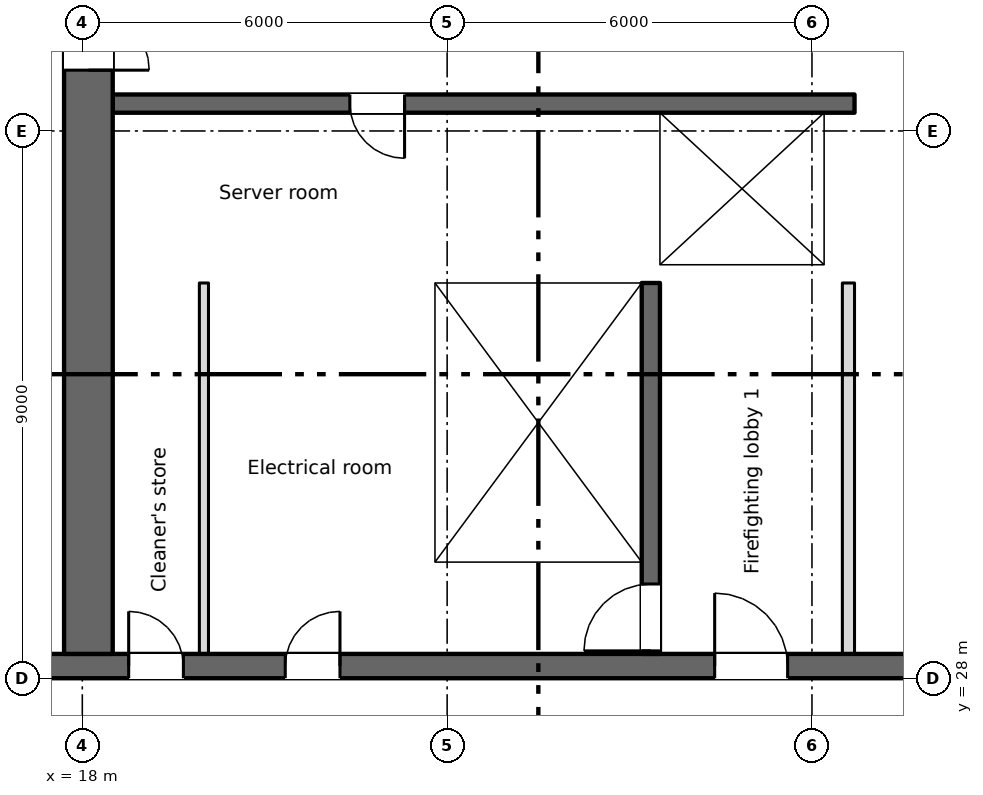
"""IFC4 building model, lengths in metres.
Left out: names, types, materials, properties, quantities, classifications, styles, units other than length and angle.
Written with IfcOpenShell. Run it as: python <this file> out.ifc"""

import sys

from ifc_helpers import new_model, si_unit, direction, frame, frame_2d, origin, place, context, subcontext, project, spatial, rectangle, extrude, element, fill, save


model = new_model("IFC4")
c1 = context("Model", 3, precision=1e-05, world=origin(), true_north=direction((0.0, 1.0)))
c2 = subcontext(c1, "Body", "Model", "MODEL_VIEW")
j1 = project(units=[si_unit("LENGTHUNIT", "METRE"), si_unit("PLANEANGLEUNIT", "RADIAN")], contexts=[c1])
p1 = place(None, origin())
s1 = spatial("IfcSite", under=j1, at=p1, CompositionType="ELEMENT")
p2 = place(p1, origin())
s2 = spatial("IfcBuilding", under=s1, at=p2, CompositionType="ELEMENT")
p3 = place(p2, frame((0.0, 0.0, 128.75)))
s3 = spatial("IfcBuildingStorey", under=s2, at=p3, CompositionType="ELEMENT", Elevation=128.75)
p4 = place(p3, frame((6.7, 28.2, 0.0), z_axis=(0.0, 0.0, 1.0), x_axis=(1.0, 0.0, 0.0)))
e1 = element("IfcWall", 1, at=p4, inside=s3, PredefinedType="SHEAR", context=c2, shape_type="SweptSolid", body=[
    extrude(rectangle(XDim=57.8, YDim=0.4, at=frame_2d((28.9, 0.0))), origin(), (0.0, 0.0, 1.0), 3.35),
])
p5 = place(p4, frame((12.062, 0.0, 0.0)))
e2 = element("IfcOpeningElement", 2, at=p5, cuts=e1, PredefinedType="OPENING", context=c2, shape_type="SweptSolid", body=[
    extrude(rectangle(XDim=0.9, YDim=2.1, at=frame_2d((0.45, 1.05))), frame((0.0, 0.21, 0.0), z_axis=(0.0, -1.0, 0.0), x_axis=(1.0, 0.0, 0.0)), (0.0, 0.0, 1.0), 0.42),
])
p6 = place(p4, frame((14.637, 0.0, 0.0)))
e3 = element("IfcOpeningElement", 3, at=p6, cuts=e1, PredefinedType="OPENING", context=c2, shape_type="SweptSolid", body=[
    extrude(rectangle(XDim=0.9, YDim=2.1, at=frame_2d((0.45, 1.05))), frame((0.0, 0.21, 0.0), z_axis=(0.0, -1.0, 0.0), x_axis=(1.0, 0.0, 0.0)), (0.0, 0.0, 1.0), 0.42),
])
p7 = place(p4, frame((49.062, 0.0, 0.0)))
e4 = element("IfcOpeningElement", 4, at=p7, cuts=e1, PredefinedType="OPENING", context=c2, shape_type="SweptSolid", body=[
    extrude(rectangle(XDim=0.9, YDim=2.1, at=frame_2d((0.45, 1.05))), frame((0.0, 0.21, 0.0), z_axis=(0.0, -1.0, 0.0), x_axis=(1.0, 0.0, 0.0)), (0.0, 0.0, 1.0), 0.42),
])
p8 = place(p4, frame((51.637, 0.0, 0.0)))
e5 = element("IfcOpeningElement", 5, at=p8, cuts=e1, PredefinedType="OPENING", context=c2, shape_type="SweptSolid", body=[
    extrude(rectangle(XDim=0.9, YDim=2.1, at=frame_2d((0.45, 1.05))), frame((0.0, 0.21, 0.0), z_axis=(0.0, -1.0, 0.0), x_axis=(1.0, 0.0, 0.0)), (0.0, 0.0, 1.0), 0.42),
])
p9 = place(p4, frame((1.35, 0.0, 0.0)))
e6 = element("IfcOpeningElement", 6, at=p9, cuts=e1, PredefinedType="OPENING", context=c2, shape_type="SweptSolid", body=[
    extrude(rectangle(XDim=0.9, YDim=2.1, at=frame_2d((0.45, 1.05))), frame((0.0, 0.21, 0.0), z_axis=(0.0, -1.0, 0.0), x_axis=(1.0, 0.0, 0.0)), (0.0, 0.0, 1.0), 0.42),
])
p10 = place(p4, frame((4.7, 0.0, 0.0)))
e7 = element("IfcOpeningElement", 7, at=p10, cuts=e1, PredefinedType="OPENING", context=c2, shape_type="SweptSolid", body=[
    extrude(rectangle(XDim=1.2, YDim=2.1, at=frame_2d((0.6, 1.05))), frame((0.0, 0.21, 0.0), z_axis=(0.0, -1.0, 0.0), x_axis=(1.0, 0.0, 0.0)), (0.0, 0.0, 1.0), 0.42),
])
p11 = place(p4, frame((31.7, 0.0, 0.0)))
e8 = element("IfcOpeningElement", 8, at=p11, cuts=e1, PredefinedType="OPENING", context=c2, shape_type="SweptSolid", body=[
    extrude(rectangle(XDim=1.2, YDim=2.1, at=frame_2d((0.6, 1.05))), frame((0.0, 0.21, 0.0), z_axis=(0.0, -1.0, 0.0), x_axis=(1.0, 0.0, 0.0)), (0.0, 0.0, 1.0), 0.42),
])
p12 = place(p4, frame((55.2, 0.0, 0.0)))
e9 = element("IfcOpeningElement", 9, at=p12, cuts=e1, PredefinedType="OPENING", context=c2, shape_type="SweptSolid", body=[
    extrude(rectangle(XDim=1.2, YDim=2.1, at=frame_2d((0.6, 1.05))), frame((0.0, 0.21, 0.0), z_axis=(0.0, -1.0, 0.0), x_axis=(1.0, 0.0, 0.0)), (0.0, 0.0, 1.0), 0.42),
])
p13 = place(p4, frame((21.7, 0.0, 0.0)))
e10 = element("IfcOpeningElement", 10, at=p13, cuts=e1, PredefinedType="OPENING", context=c2, shape_type="SweptSolid", body=[
    extrude(rectangle(XDim=1.2, YDim=2.1, at=frame_2d((0.6, 1.05))), frame((0.0, 0.21, 0.0), z_axis=(0.0, -1.0, 0.0), x_axis=(1.0, 0.0, 0.0)), (0.0, 0.0, 1.0), 0.42),
])
p14 = place(p4, frame((41.7, 0.0, 0.0)))
e11 = element("IfcOpeningElement", 11, at=p14, cuts=e1, PredefinedType="OPENING", context=c2, shape_type="SweptSolid", body=[
    extrude(rectangle(XDim=1.2, YDim=2.1, at=frame_2d((0.6, 1.05))), frame((0.0, 0.21, 0.0), z_axis=(0.0, -1.0, 0.0), x_axis=(1.0, 0.0, 0.0)), (0.0, 0.0, 1.0), 0.42),
])
p15 = place(p4, frame((24.85, 0.0, 0.0)))
e12 = element("IfcOpeningElement", 12, at=p15, cuts=e1, PredefinedType="OPENING", context=c2, shape_type="SweptSolid", body=[
    extrude(rectangle(XDim=2.4, YDim=2.1, at=frame_2d((1.2, 1.05))), frame((0.0, 0.21, 0.0), z_axis=(0.0, -1.0, 0.0), x_axis=(1.0, 0.0, 0.0)), (0.0, 0.0, 1.0), 0.42),
])
p16 = place(p4, frame((37.35, 0.0, 0.0)))
e13 = element("IfcOpeningElement", 13, at=p16, cuts=e1, PredefinedType="OPENING", context=c2, shape_type="SweptSolid", body=[
    extrude(rectangle(XDim=2.4, YDim=2.1, at=frame_2d((1.2, 1.05))), frame((0.0, 0.21, 0.0), z_axis=(0.0, -1.0, 0.0), x_axis=(1.0, 0.0, 0.0)), (0.0, 0.0, 1.0), 0.42),
])
p17 = place(p4, frame((7.95, 0.0, 0.0)))
e14 = element("IfcOpeningElement", 14, at=p17, cuts=e1, PredefinedType="OPENING", context=c2, shape_type="SweptSolid", body=[
    extrude(rectangle(XDim=2.4, YDim=2.1, at=frame_2d((1.2, 1.05))), frame((0.0, 0.21, 0.0), z_axis=(0.0, -1.0, 0.0), x_axis=(1.0, 0.0, 0.0)), (0.0, 0.0, 1.0), 0.42),
])
p18 = place(p4, frame((28.85, 0.0, 0.0)))
e15 = element("IfcOpeningElement", 15, at=p18, cuts=e1, PredefinedType="OPENING", context=c2, shape_type="SweptSolid", body=[
    extrude(rectangle(XDim=0.9, YDim=2.1, at=frame_2d((0.45, 1.05))), frame((0.0, 0.21, 0.0), z_axis=(0.0, -1.0, 0.0), x_axis=(1.0, 0.0, 0.0)), (0.0, 0.0, 1.0), 0.42),
])
p19 = place(p4, frame((34.85, 0.0, 0.0)))
e16 = element("IfcOpeningElement", 16, at=p19, cuts=e1, PredefinedType="OPENING", context=c2, shape_type="SweptSolid", body=[
    extrude(rectangle(XDim=0.9, YDim=2.1, at=frame_2d((0.45, 1.05))), frame((0.0, 0.21, 0.0), z_axis=(0.0, -1.0, 0.0), x_axis=(1.0, 0.0, 0.0)), (0.0, 0.0, 1.0), 0.42),
])
p20 = place(p3, frame((18.1, 28.4, 0.0), z_axis=(0.0, 0.0, 1.0), x_axis=(0.0, 1.0, 0.0)))
e17 = element("IfcWall", 17, at=p20, inside=s3, PredefinedType="SHEAR", context=c2, shape_type="SweptSolid", body=[
    extrude(rectangle(XDim=16.8, YDim=0.8, at=frame_2d((8.4, 0.0))), origin(), (0.0, 0.0, 1.0), 3.35),
])
p21 = place(p20, frame((9.6, 0.0, 0.0)))
e18 = element("IfcOpeningElement", 18, at=p21, cuts=e17, PredefinedType="OPENING", context=c2, shape_type="SweptSolid", body=[
    extrude(rectangle(XDim=2.0, YDim=2.1, at=frame_2d((1.0, 1.05))), frame((0.0, 0.41, 0.0), z_axis=(0.0, -1.0, 0.0), x_axis=(1.0, 0.0, 0.0)), (0.0, 0.0, 1.0), 0.82),
])
p22 = place(p20, frame((15.35, 0.0, 0.0)))
e19 = element("IfcOpeningElement", 19, at=p22, cuts=e17, PredefinedType="OPENING", context=c2, shape_type="SweptSolid", body=[
    extrude(rectangle(XDim=1.2, YDim=2.1, at=frame_2d((0.6, 1.05))), frame((0.0, 0.41, 0.0), z_axis=(0.0, -1.0, 0.0), x_axis=(1.0, 0.0, 0.0)), (0.0, 0.0, 1.0), 0.82),
])
p23 = place(p3, frame((23.65, 28.4, 0.0), z_axis=(0.0, 0.0, 1.0), x_axis=(0.0, 1.0, 0.0)))
e20 = element("IfcWall", 20, at=p23, inside=s3, PredefinedType="SHEAR", context=c2, shape_type="SweptSolid", body=[
    extrude(rectangle(XDim=6.1, YDim=0.3, at=frame_2d((3.05, 0.0))), origin(), (0.0, 0.0, 1.0), 3.35),
])
p24 = place(p3, frame((27.35, 28.4, 0.0), z_axis=(0.0, 0.0, 1.0), x_axis=(0.0, 1.0, 0.0)))
e21 = element("IfcWall", 21, at=p24, inside=s3, PredefinedType="SHEAR", context=c2, shape_type="SweptSolid", body=[
    extrude(rectangle(XDim=6.1, YDim=0.3, at=frame_2d((3.05, 0.0))), origin(), (0.0, 0.0, 1.0), 3.35),
])
p25 = place(p24, frame((0.05, 0.0, 0.0)))
e22 = element("IfcOpeningElement", 22, at=p25, cuts=e21, PredefinedType="OPENING", context=c2, shape_type="SweptSolid", body=[
    extrude(rectangle(XDim=1.1, YDim=2.1, at=frame_2d((0.55, 1.05))), frame((0.0, 0.16, 0.0), z_axis=(0.0, -1.0, 0.0), x_axis=(1.0, 0.0, 0.0)), (0.0, 0.0, 1.0), 0.32),
])
p26 = place(p3, frame((18.5, 34.65, 0.0), z_axis=(0.0, 0.0, 1.0), x_axis=(1.0, 0.0, 0.0)))
e23 = element("IfcWall", 23, at=p26, inside=s3, PredefinedType="SHEAR", context=c2, shape_type="SweptSolid", body=[
    extrude(rectangle(XDim=12.2, YDim=0.3, at=frame_2d((6.1, 0.0))), origin(), (0.0, 0.0, 1.0), 3.35),
])
p27 = place(p26, frame((9.8, 0.0, 0.0)))
e24 = element("IfcOpeningElement", 24, at=p27, cuts=e23, PredefinedType="OPENING", context=c2, shape_type="SweptSolid", body=[
    extrude(rectangle(XDim=1.1, YDim=2.1, at=frame_2d((0.55, 1.05))), frame((0.0, 0.16, 0.0), z_axis=(0.0, -1.0, 0.0), x_axis=(1.0, 0.0, 0.0)), (0.0, 0.0, 1.0), 0.32),
])
p28 = place(p3, frame((30.7, 37.45, 0.0), z_axis=(0.0, 0.0, 1.0), x_axis=(-1.0, 0.0, 0.0)))
e25 = element("IfcWall", 25, at=p28, inside=s3, PredefinedType="SHEAR", context=c2, shape_type="SweptSolid", body=[
    extrude(rectangle(XDim=12.2, YDim=0.3, at=frame_2d((6.1, 0.0))), origin(), (0.0, 0.0, 1.0), 3.35),
])
p29 = place(p28, frame((7.4, 0.0, 0.0)))
e26 = element("IfcOpeningElement", 26, at=p29, cuts=e25, PredefinedType="OPENING", context=c2, shape_type="SweptSolid", body=[
    extrude(rectangle(XDim=0.9, YDim=2.1, at=frame_2d((0.45, 1.05))), frame((0.0, 0.16, 0.0), z_axis=(0.0, -1.0, 0.0), x_axis=(1.0, 0.0, 0.0)), (0.0, 0.0, 1.0), 0.32),
])
p30 = place(p3, frame((27.35, 34.8, 0.0), z_axis=(0.0, 0.0, 1.0), x_axis=(0.0, 1.0, 0.0)))
e27 = element("IfcWall", 27, at=p30, inside=s3, PredefinedType="SHEAR", context=c2, shape_type="SweptSolid", body=[
    extrude(rectangle(XDim=2.5, YDim=0.3, at=frame_2d((1.25, 0.0))), origin(), (0.0, 0.0, 1.0), 3.35),
])
p31 = place(p3, frame((30.45, 34.8, 0.0), z_axis=(0.0, 0.0, 1.0), x_axis=(0.0, 1.0, 0.0)))
e28 = element("IfcWall", 28, at=p31, inside=s3, PredefinedType="SHEAR", context=c2, shape_type="SweptSolid", body=[
    extrude(rectangle(XDim=2.5, YDim=0.5, at=frame_2d((1.25, 0.0))), origin(), (0.0, 0.0, 1.0), 3.35),
])
p32 = place(p3, frame((30.6, 28.4, 0.0), z_axis=(0.0, 0.0, 1.0), x_axis=(0.0, 1.0, 0.0)))
e29 = element("IfcWall", 29, at=p32, inside=s3, PredefinedType="PARTITIONING", context=c2, shape_type="SweptSolid", body=[
    extrude(rectangle(XDim=6.1, YDim=0.2, at=frame_2d((3.05, 0.0))), origin(), (0.0, 0.0, 1.0), 3.35),
])
p33 = place(p3, frame((20.0, 28.4, 0.0), z_axis=(0.0, 0.0, 1.0), x_axis=(0.0, 1.0, 0.0)))
e30 = element("IfcWall", 30, at=p33, inside=s3, PredefinedType="PARTITIONING", context=c2, shape_type="SweptSolid", body=[
    extrude(rectangle(XDim=6.1, YDim=0.15, at=frame_2d((3.05, 0.0))), origin(), (0.0, 0.0, 1.0), 3.35),
])
p34 = place(p5, origin())
e31 = element("IfcDoor", 31, at=p34, inside=s3, OperationType="SINGLE_SWING_LEFT", PredefinedType="DOOR", context=c2, shape_type="SweptSolid", body=[
    extrude(rectangle(XDim=0.9, YDim=2.1, at=frame_2d((0.45, 1.05))), frame((0.0, 0.025, 0.0), z_axis=(0.0, -1.0, 0.0), x_axis=(1.0, 0.0, 0.0)), (0.0, 0.0, 1.0), 0.05),
])
fill(e2, e31)
p35 = place(p6, origin())
e32 = element("IfcDoor", 32, at=p35, inside=s3, OperationType="SINGLE_SWING_RIGHT", PredefinedType="DOOR", context=c2, shape_type="SweptSolid", body=[
    extrude(rectangle(XDim=0.9, YDim=2.1, at=frame_2d((0.45, 1.05))), frame((0.0, 0.025, 0.0), z_axis=(0.0, -1.0, 0.0), x_axis=(1.0, 0.0, 0.0)), (0.0, 0.0, 1.0), 0.05),
])
fill(e3, e32)
p36 = place(p29, origin())
e33 = element("IfcDoor", 33, at=p36, inside=s3, OperationType="SINGLE_SWING_LEFT", PredefinedType="DOOR", context=c2, shape_type="SweptSolid", body=[
    extrude(rectangle(XDim=0.9, YDim=2.1, at=frame_2d((0.45, 1.05))), frame((0.0, 0.025, 0.0), z_axis=(0.0, -1.0, 0.0), x_axis=(1.0, 0.0, 0.0)), (0.0, 0.0, 1.0), 0.05),
])
fill(e26, e33)
p37 = place(p27, origin())
e34 = element("IfcDoor", 34, at=p37, inside=s3, OperationType="SLIDING_TO_LEFT", PredefinedType="DOOR", context=c2, shape_type="SweptSolid", body=[
    extrude(rectangle(XDim=1.1, YDim=2.1, at=frame_2d((0.55, 1.05))), frame((0.0, 0.025, 0.0), z_axis=(0.0, -1.0, 0.0), x_axis=(1.0, 0.0, 0.0)), (0.0, 0.0, 1.0), 0.05),
])
fill(e24, e34)
p38 = place(p25, origin())
e35 = element("IfcDoor", 35, at=p38, inside=s3, OperationType="SINGLE_SWING_LEFT", PredefinedType="DOOR", context=c2, shape_type="SweptSolid", body=[
    extrude(rectangle(XDim=1.1, YDim=2.1, at=frame_2d((0.55, 1.05))), frame((0.0, 0.025, 0.0), z_axis=(0.0, -1.0, 0.0), x_axis=(1.0, 0.0, 0.0)), (0.0, 0.0, 1.0), 0.05),
])
fill(e22, e35)
p39 = place(p13, origin())
e36 = element("IfcDoor", 36, at=p39, inside=s3, OperationType="SINGLE_SWING_LEFT", PredefinedType="DOOR", context=c2, shape_type="SweptSolid", body=[
    extrude(rectangle(XDim=1.2, YDim=2.1, at=frame_2d((0.6, 1.05))), frame((0.0, 0.025, 0.0), z_axis=(0.0, -1.0, 0.0), x_axis=(1.0, 0.0, 0.0)), (0.0, 0.0, 1.0), 0.05),
])
fill(e10, e36)
p40 = place(p21, origin())
e37 = element("IfcDoor", 37, at=p40, inside=s3, OperationType="DOUBLE_DOOR_SINGLE_SWING", PredefinedType="DOOR", context=c2, shape_type="SweptSolid", body=[
    extrude(rectangle(XDim=2.0, YDim=2.1, at=frame_2d((1.0, 1.05))), frame((0.0, 0.025, 0.0), z_axis=(0.0, -1.0, 0.0), x_axis=(1.0, 0.0, 0.0)), (0.0, 0.0, 1.0), 0.05),
])
fill(e18, e37)
save(model, sys.argv[1])
